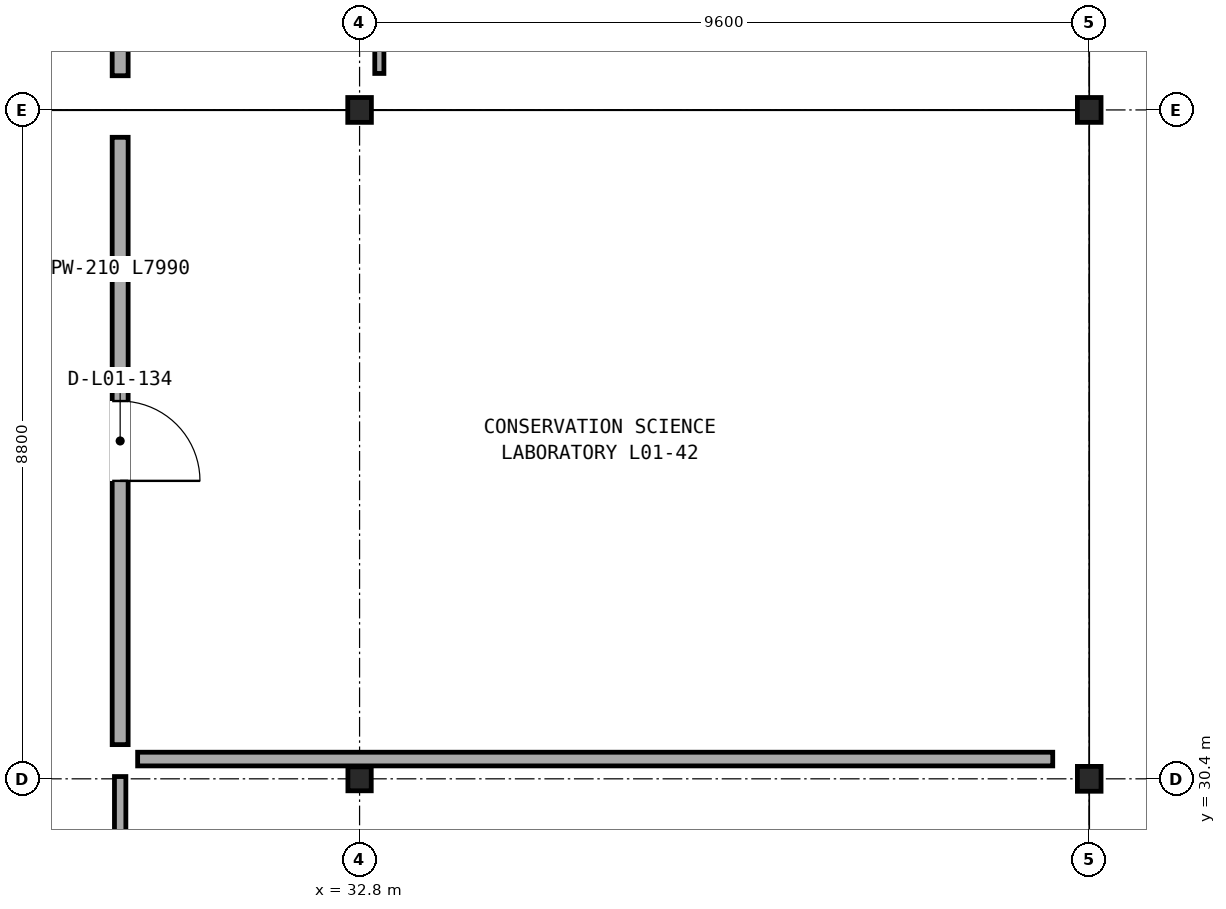
"""IFC4 building model, lengths in metres.
Left out: names, types, materials, properties, quantities, classifications, styles, units other than length and angle.
Written with IfcOpenShell. Run it as: python <this file> out.ifc"""

import sys

from ifc_helpers import new_model, si_unit, direction, frame, frame_2d, origin, origin_2d, place, context, subcontext, project, spatial, rectangle, i_section, extrude, element, fill, save


model = new_model("IFC4")
c1 = context("Model", 3, precision=1e-05, world=origin(), true_north=direction((0.0, 1.0)))
c2 = subcontext(c1, "Body", "Model", "MODEL_VIEW")
j1 = project(units=[si_unit("LENGTHUNIT", "METRE"), si_unit("PLANEANGLEUNIT", "RADIAN")], contexts=[c1])
p1 = place(None, origin())
s1 = spatial("IfcSite", under=j1, at=p1, CompositionType="ELEMENT")
p2 = place(p1, origin())
s2 = spatial("IfcBuilding", under=s1, at=p2, CompositionType="ELEMENT")
p3 = place(p2, frame((0.0, 0.0, 5.6)))
s3 = spatial("IfcBuildingStorey", under=s2, at=p3, CompositionType="ELEMENT", Elevation=5.6)
p4 = place(p3, frame((32.8, 30.4, 0.0), z_axis=(0.0, 0.0, 1.0), x_axis=(1.0, 0.0, 0.0)))
e1 = element("IfcColumn", 1, at=p4, inside=s3, PredefinedType="COLUMN", context=c2, shape_type="SweptSolid", body=[
    extrude(i_section(OverallWidth=0.307, OverallDepth=0.315, WebThickness=0.012, FlangeThickness=0.019, FilletRadius=0.017, at=origin_2d()), origin(), (0.0, 0.0, 1.0), 4.5),
])
for number, where, z_axis, x_axis in (
    (2, (32.8, 39.2, 0.0), (0.0, 0.0, 1.0), (1.0, 0.0, 0.0)),
    (3, (42.4, 30.4, 0.0), (0.0, 0.0, 1.0), (1.0, 0.0, 0.0)),
    (4, (42.4, 39.2, 0.0), (0.0, 0.0, 1.0), (1.0, 0.0, 0.0)),
):
    element("IfcColumn", number, at=place(p3, frame(where, z_axis=z_axis, x_axis=x_axis)), inside=s3, PredefinedType="COLUMN", context=c2, shape_type="SweptSolid", body=[
        extrude(i_section(OverallWidth=0.311, OverallDepth=0.327, WebThickness=0.016, FlangeThickness=0.025, FilletRadius=0.017, at=origin_2d()), origin(), (0.0, 0.0, 1.0), 4.5),
    ])
p5 = place(p3, frame((29.65, 39.65, 0.0), z_axis=(0.0, 0.0, 1.0), x_axis=(0.0, 1.0, 0.0)))
e5 = element("IfcWall", 5, at=p5, inside=s3, PredefinedType="PARTITIONING", context=c2, shape_type="SweptSolid", body=[
    extrude(rectangle(XDim=11.27, YDim=0.21, at=frame_2d((5.635, 0.0))), origin(), (0.0, 0.0, 1.0), 3.583),
])
p6 = place(p3, frame((29.65, 27.88, 0.0), z_axis=(0.0, 0.0, 1.0), x_axis=(0.0, 1.0, 0.0)))
e6 = element("IfcWall", 6, at=p6, inside=s3, PredefinedType="PARTITIONING", context=c2, shape_type="SweptSolid", body=[
    extrude(rectangle(XDim=2.55, YDim=0.15, at=frame_2d((1.275, 0.0))), origin(), (0.0, 0.0, 1.0), 3.653),
])
p7 = place(p3, frame((29.65, 30.85, 0.0), z_axis=(0.0, 0.0, 1.0), x_axis=(0.0, 1.0, 0.0)))
e7 = element("IfcWall", 7, at=p7, inside=s3, PredefinedType="PARTITIONING", context=c2, shape_type="SweptSolid", body=[
    extrude(rectangle(XDim=7.99, YDim=0.21, at=frame_2d((3.995, 0.0))), origin(), (0.0, 0.0, 1.0), 4.13),
])
p8 = place(p7, frame((3.47, 0.0, 0.0)))
e8 = element("IfcOpeningElement", 8, at=p8, cuts=e7, PredefinedType="OPENING", context=c2, shape_type="SweptSolid", body=[
    extrude(rectangle(XDim=1.05, YDim=2.15, at=frame_2d((0.525, 1.075))), frame((0.0, 0.115, 0.0), z_axis=(0.0, -1.0, 0.0), x_axis=(1.0, 0.0, 0.0)), (0.0, 0.0, 1.0), 0.23),
])
p9 = place(p3, frame((33.06, 50.92, 0.0), z_axis=(0.0, 0.0, 1.0), x_axis=(0.0, -1.0, 0.0)))
e9 = element("IfcWall", 9, at=p9, inside=s3, PredefinedType="PARTITIONING", context=c2, shape_type="SweptSolid", body=[
    extrude(rectangle(XDim=11.24, YDim=0.12, at=frame_2d((5.62, 0.0))), origin(), (0.0, 0.0, 1.0), 3.583),
])
p10 = place(p3, frame((29.88, 30.66, 0.0), z_axis=(0.0, 0.0, 1.0), x_axis=(1.0, 0.0, 0.0)))
e10 = element("IfcWall", 10, at=p10, inside=s3, PredefinedType="PARTITIONING", context=c2, shape_type="SweptSolid", body=[
    extrude(rectangle(XDim=12.04, YDim=0.18, at=frame_2d((6.02, 0.0))), origin(), (0.0, 0.0, 1.0), 3.653),
])
p11 = place(p8, frame((1.05, 0.0, 0.0), z_axis=(0.0, 0.0, 1.0), x_axis=(-1.0, 0.0, 0.0)))
e11 = element("IfcDoor", 11, at=p11, inside=s3, OperationType="SINGLE_SWING_LEFT", PredefinedType="DOOR", context=c2, shape_type="SweptSolid", body=[
    extrude(rectangle(XDim=1.05, YDim=2.15, at=frame_2d((0.525, 1.075))), frame((0.0, 0.025, 0.0), z_axis=(0.0, -1.0, 0.0), x_axis=(1.0, 0.0, 0.0)), (0.0, 0.0, 1.0), 0.05),
])
fill(e8, e11)
save(model, sys.argv[1])
